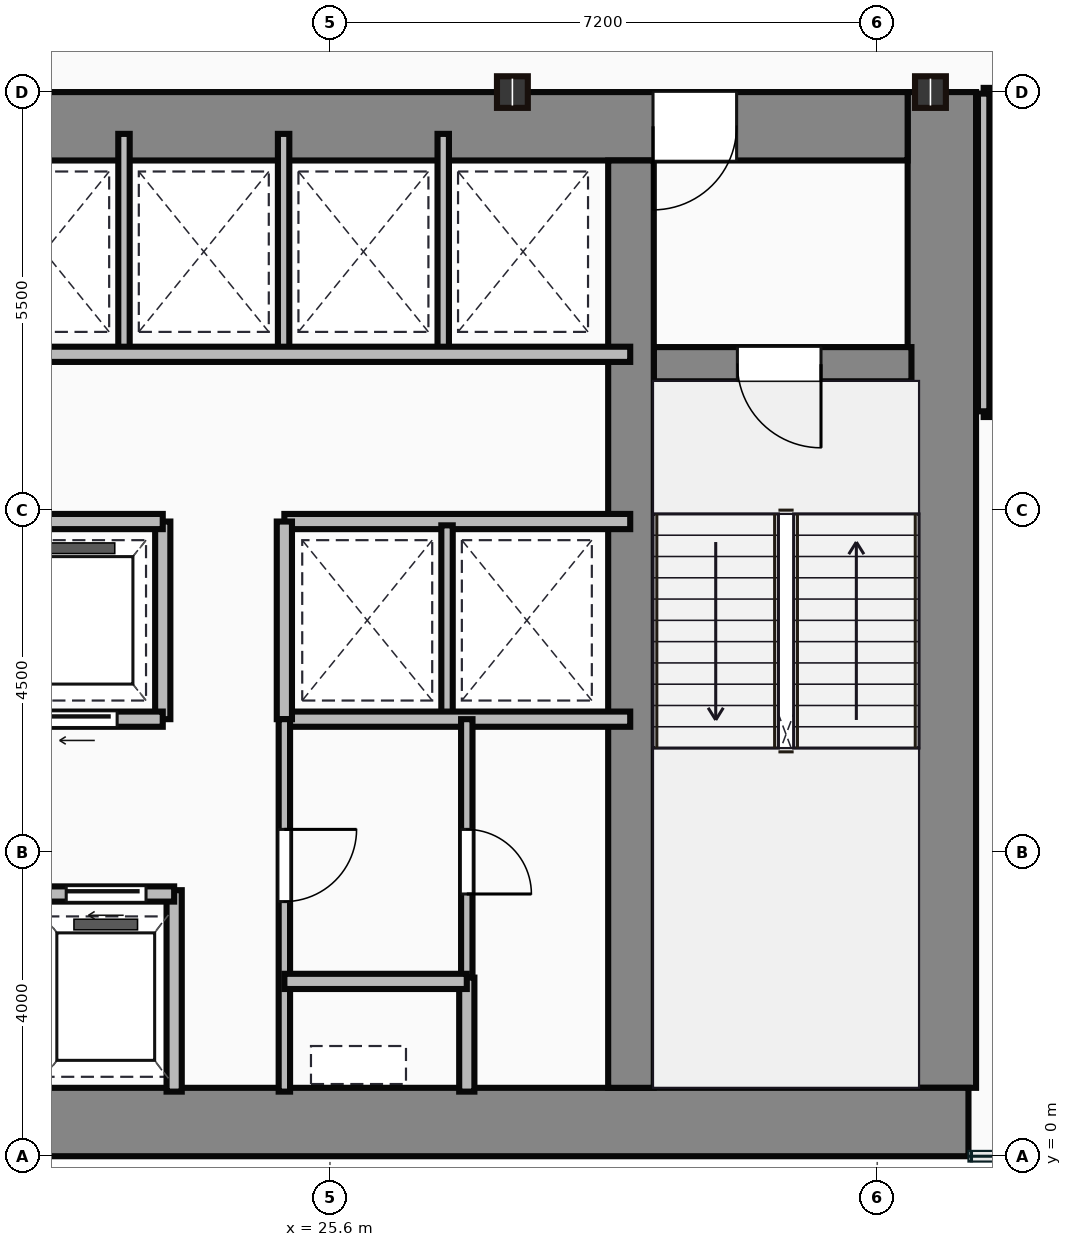
"""IFC4 building model, lengths in metres.
Left out: names, types, materials, properties, quantities, classifications, styles, units other than length and angle.
Written with IfcOpenShell. Run it as: python <this file> out.ifc"""

import sys

from ifc_helpers import new_model, si_unit, direction, frame, frame_2d, origin, origin_2d, place, context, subcontext, project, spatial, rectangle, i_section, extrude, source, transform, mapped, element, fill, save


model = new_model("IFC4")
c1 = context("Model", 3, precision=1e-05, world=origin(), true_north=direction((0.0, 1.0)))
c2 = subcontext(c1, "Body", "Model", "MODEL_VIEW")
j1 = project(units=[si_unit("LENGTHUNIT", "METRE"), si_unit("PLANEANGLEUNIT", "RADIAN")], contexts=[c1])
p1 = place(None, origin())
s1 = spatial("IfcSite", under=j1, at=p1, CompositionType="ELEMENT")
p2 = place(p1, origin())
s2 = spatial("IfcBuilding", under=s1, at=p2, CompositionType="ELEMENT")
p3 = place(p2, frame((0.0, 0.0, 79.95)))
s3 = spatial("IfcBuildingStorey", under=s2, at=p3, CompositionType="ELEMENT", Elevation=79.95)
m1 = source(origin(), c2, "Body", "SweptSolid", [
    extrude(rectangle(XDim=29.5, YDim=0.9, at=frame_2d((14.75, 0.0))), origin(), (0.0, 0.0, 1.0), 4.2),
])
p4 = place(p3, frame((4.5, 0.45, 0.0), z_axis=(0.0, 0.0, 1.0), x_axis=(1.0, 0.0, 0.0)))
e1 = element("IfcWall", 1, at=p4, inside=s3, PredefinedType="SHEAR", context=c2, shape_type="MappedRepresentation", body=[
    mapped(m1, transform((0.0, 0.0, 0.0))),
])
m2 = source(origin(), c2, "Body", "SweptSolid", [
    extrude(rectangle(XDim=13.1, YDim=0.9, at=frame_2d((6.55, 0.0))), origin(), (0.0, 0.0, 1.0), 4.2),
])
p5 = place(p3, frame((33.65, 0.9, 0.0), z_axis=(0.0, 0.0, 1.0), x_axis=(0.0, 1.0, 0.0)))
e2 = element("IfcWall", 2, at=p5, inside=s3, PredefinedType="SHEAR", context=c2, shape_type="MappedRepresentation", body=[
    mapped(m2, transform((0.0, 0.0, 0.0))),
])
m3 = source(origin(), c2, "Body", "SweptSolid", [
    extrude(rectangle(XDim=12.6, YDim=0.9, at=frame_2d((6.3, 0.0))), origin(), (0.0, 0.0, 1.0), 4.2),
])
p6 = place(p3, frame((20.6, 13.55, 0.0), z_axis=(0.0, 0.0, 1.0), x_axis=(1.0, 0.0, 0.0)))
e3 = element("IfcWall", 3, at=p6, inside=s3, PredefinedType="SHEAR", context=c2, shape_type="MappedRepresentation", body=[
    mapped(m3, transform((0.0, 0.0, 0.0))),
])
p7 = place(p6, frame((9.25, 0.0, 0.0)))
e4 = element("IfcOpeningElement", 4, at=p7, cuts=e3, PredefinedType="OPENING", context=c2, shape_type="SweptSolid", body=[
    extrude(rectangle(XDim=1.1, YDim=2.15, at=frame_2d((0.55, 1.075))), frame((0.0, 0.46, 0.0), z_axis=(0.0, -1.0, 0.0), x_axis=(1.0, 0.0, 0.0)), (0.0, 0.0, 1.0), 0.92),
])
m4 = source(origin(), c2, "Body", "SweptSolid", [
    extrude(rectangle(XDim=12.2, YDim=0.6, at=frame_2d((6.1, 0.0))), origin(), (0.0, 0.0, 1.0), 4.2),
])
p8 = place(p3, frame((29.56, 0.9, 0.0), z_axis=(0.0, 0.0, 1.0), x_axis=(0.0, 1.0, 0.0)))
e5 = element("IfcWall", 5, at=p8, inside=s3, PredefinedType="SHEAR", context=c2, shape_type="MappedRepresentation", body=[
    mapped(m4, transform((0.0, 0.0, 0.0))),
])
m5 = source(origin(), c2, "Body", "SweptSolid", [
    extrude(rectangle(XDim=3.39, YDim=0.45, at=frame_2d((1.695, 0.0))), origin(), (0.0, 0.0, 1.0), 4.2),
])
p9 = place(p3, frame((29.86, 10.42, 0.0), z_axis=(0.0, 0.0, 1.0), x_axis=(1.0, 0.0, 0.0)))
e6 = element("IfcWall", 6, at=p9, inside=s3, PredefinedType="SHEAR", context=c2, shape_type="MappedRepresentation", body=[
    mapped(m5, transform((0.0, 0.0, 0.0))),
])
p10 = place(p9, frame((1.1, 0.0, 0.0)))
e7 = element("IfcOpeningElement", 7, at=p10, cuts=e6, PredefinedType="OPENING", context=c2, shape_type="SweptSolid", body=[
    extrude(rectangle(XDim=1.1, YDim=2.15, at=frame_2d((0.55, 1.075))), frame((0.0, 0.235, 0.0), z_axis=(0.0, -1.0, 0.0), x_axis=(1.0, 0.0, 0.0)), (0.0, 0.0, 1.0), 0.47),
])
m6 = source(origin(), c2, "Body", "SweptSolid", [
    extrude(i_section(OverallWidth=0.406, OverallDepth=0.416, WebThickness=0.03, FlangeThickness=0.048, at=origin_2d()), origin(), (0.0, 0.0, 1.0), 4.2),
])
for number, where, z_axis, x_axis in (
    (8, (28.0, 14.0, 0.0), (0.0, 0.0, 1.0), (1.0, 0.0, 0.0)),
    (9, (33.5, 14.0, 0.0), (0.0, 0.0, 1.0), (1.0, 0.0, 0.0)),
):
    element("IfcColumn", number, at=place(p3, frame(where, z_axis=z_axis, x_axis=x_axis)), inside=s3, PredefinedType="COLUMN", context=c2, shape_type="MappedRepresentation", body=[
        mapped(m6, transform((0.0, 0.0, 0.0))),
    ])
m7 = source(origin(), c2, "Body", "SweptSolid", [
    extrude(rectangle(XDim=10.5, YDim=0.2, at=frame_2d((5.25, 0.0))), origin(), (0.0, 0.0, 1.0), 3.9),
])
p11 = place(p3, frame((13.05, 3.45, 0.0), z_axis=(0.0, 0.0, 1.0), x_axis=(1.0, 0.0, 0.0)))
e10 = element("IfcWall", 10, at=p11, inside=s3, PredefinedType="PARTITIONING", context=c2, shape_type="MappedRepresentation", body=[
    mapped(m7, transform((0.0, 0.0, 0.0))),
])
p12 = place(p11, frame((0.38, 0.0, 0.0)))
e11 = element("IfcOpeningElement", 11, at=p12, cuts=e10, PredefinedType="OPENING", context=c2, shape_type="SweptSolid", body=[
    extrude(rectangle(XDim=1.05, YDim=2.15, at=frame_2d((0.525, 1.075))), frame((0.0, 0.11, 0.0), z_axis=(0.0, -1.0, 0.0), x_axis=(1.0, 0.0, 0.0)), (0.0, 0.0, 1.0), 0.22),
])
p13 = place(p11, frame((2.12, 0.0, 0.0)))
e12 = element("IfcOpeningElement", 12, at=p13, cuts=e10, PredefinedType="OPENING", context=c2, shape_type="SweptSolid", body=[
    extrude(rectangle(XDim=1.05, YDim=2.15, at=frame_2d((0.525, 1.075))), frame((0.0, 0.11, 0.0), z_axis=(0.0, -1.0, 0.0), x_axis=(1.0, 0.0, 0.0)), (0.0, 0.0, 1.0), 0.22),
])
p14 = place(p11, frame((3.86, 0.0, 0.0)))
e13 = element("IfcOpeningElement", 13, at=p14, cuts=e10, PredefinedType="OPENING", context=c2, shape_type="SweptSolid", body=[
    extrude(rectangle(XDim=1.05, YDim=2.15, at=frame_2d((0.525, 1.075))), frame((0.0, 0.11, 0.0), z_axis=(0.0, -1.0, 0.0), x_axis=(1.0, 0.0, 0.0)), (0.0, 0.0, 1.0), 0.22),
])
p15 = place(p11, frame((5.6, 0.0, 0.0)))
e14 = element("IfcOpeningElement", 14, at=p15, cuts=e10, PredefinedType="OPENING", context=c2, shape_type="SweptSolid", body=[
    extrude(rectangle(XDim=1.05, YDim=2.15, at=frame_2d((0.525, 1.075))), frame((0.0, 0.11, 0.0), z_axis=(0.0, -1.0, 0.0), x_axis=(1.0, 0.0, 0.0)), (0.0, 0.0, 1.0), 0.22),
])
p16 = place(p11, frame((7.34, 0.0, 0.0)))
e15 = element("IfcOpeningElement", 15, at=p16, cuts=e10, PredefinedType="OPENING", context=c2, shape_type="SweptSolid", body=[
    extrude(rectangle(XDim=1.05, YDim=2.15, at=frame_2d((0.525, 1.075))), frame((0.0, 0.11, 0.0), z_axis=(0.0, -1.0, 0.0), x_axis=(1.0, 0.0, 0.0)), (0.0, 0.0, 1.0), 0.22),
])
p17 = place(p11, frame((9.08, 0.0, 0.0)))
e16 = element("IfcOpeningElement", 16, at=p17, cuts=e10, PredefinedType="OPENING", context=c2, shape_type="SweptSolid", body=[
    extrude(rectangle(XDim=1.05, YDim=2.15, at=frame_2d((0.525, 1.075))), frame((0.0, 0.11, 0.0), z_axis=(0.0, -1.0, 0.0), x_axis=(1.0, 0.0, 0.0)), (0.0, 0.0, 1.0), 0.22),
])
m8 = source(origin(), c2, "Body", "SweptSolid", [
    extrude(rectangle(XDim=2.65, YDim=0.2, at=frame_2d((1.325, 0.0))), origin(), (0.0, 0.0, 1.0), 3.9),
])
p18 = place(p3, frame((23.55, 0.85, 0.0), z_axis=(0.0, 0.0, 1.0), x_axis=(0.0, 1.0, 0.0)))
e17 = element("IfcWall", 17, at=p18, inside=s3, PredefinedType="PARTITIONING", context=c2, shape_type="MappedRepresentation", body=[
    mapped(m8, transform((0.0, 0.0, 0.0))),
])
m9 = source(origin(), c2, "Body", "SweptSolid", [
    extrude(rectangle(XDim=11.85, YDim=0.2, at=frame_2d((5.925, 0.0))), origin(), (0.0, 0.0, 1.0), 3.9),
])
p19 = place(p3, frame((11.55, 5.75, 0.0), z_axis=(0.0, 0.0, 1.0), x_axis=(1.0, 0.0, 0.0)))
e18 = element("IfcWall", 18, at=p19, inside=s3, PredefinedType="PARTITIONING", context=c2, shape_type="MappedRepresentation", body=[
    mapped(m9, transform((0.0, 0.0, 0.0))),
])
p20 = place(p19, frame((0.45, 0.0, 0.0)))
e19 = element("IfcOpeningElement", 19, at=p20, cuts=e18, PredefinedType="OPENING", context=c2, shape_type="SweptSolid", body=[
    extrude(rectangle(XDim=1.05, YDim=2.15, at=frame_2d((0.525, 1.075))), frame((0.0, 0.11, 0.0), z_axis=(0.0, -1.0, 0.0), x_axis=(1.0, 0.0, 0.0)), (0.0, 0.0, 1.0), 0.22),
])
p21 = place(p19, frame((2.4, 0.0, 0.0)))
e20 = element("IfcOpeningElement", 20, at=p21, cuts=e18, PredefinedType="OPENING", context=c2, shape_type="SweptSolid", body=[
    extrude(rectangle(XDim=1.05, YDim=2.15, at=frame_2d((0.525, 1.075))), frame((0.0, 0.11, 0.0), z_axis=(0.0, -1.0, 0.0), x_axis=(1.0, 0.0, 0.0)), (0.0, 0.0, 1.0), 0.22),
])
p22 = place(p19, frame((4.35, 0.0, 0.0)))
e21 = element("IfcOpeningElement", 21, at=p22, cuts=e18, PredefinedType="OPENING", context=c2, shape_type="SweptSolid", body=[
    extrude(rectangle(XDim=1.05, YDim=2.15, at=frame_2d((0.525, 1.075))), frame((0.0, 0.11, 0.0), z_axis=(0.0, -1.0, 0.0), x_axis=(1.0, 0.0, 0.0)), (0.0, 0.0, 1.0), 0.22),
])
p23 = place(p19, frame((6.3, 0.0, 0.0)))
e22 = element("IfcOpeningElement", 22, at=p23, cuts=e18, PredefinedType="OPENING", context=c2, shape_type="SweptSolid", body=[
    extrude(rectangle(XDim=1.05, YDim=2.15, at=frame_2d((0.525, 1.075))), frame((0.0, 0.11, 0.0), z_axis=(0.0, -1.0, 0.0), x_axis=(1.0, 0.0, 0.0)), (0.0, 0.0, 1.0), 0.22),
])
p24 = place(p19, frame((8.25, 0.0, 0.0)))
e23 = element("IfcOpeningElement", 23, at=p24, cuts=e18, PredefinedType="OPENING", context=c2, shape_type="SweptSolid", body=[
    extrude(rectangle(XDim=1.05, YDim=2.15, at=frame_2d((0.525, 1.075))), frame((0.0, 0.11, 0.0), z_axis=(0.0, -1.0, 0.0), x_axis=(1.0, 0.0, 0.0)), (0.0, 0.0, 1.0), 0.22),
])
p25 = place(p19, frame((10.2, 0.0, 0.0)))
e24 = element("IfcOpeningElement", 24, at=p25, cuts=e18, PredefinedType="OPENING", context=c2, shape_type="SweptSolid", body=[
    extrude(rectangle(XDim=1.05, YDim=2.15, at=frame_2d((0.525, 1.075))), frame((0.0, 0.11, 0.0), z_axis=(0.0, -1.0, 0.0), x_axis=(1.0, 0.0, 0.0)), (0.0, 0.0, 1.0), 0.22),
])
p26 = place(p3, frame((11.55, 8.35, 0.0), z_axis=(0.0, 0.0, 1.0), x_axis=(1.0, 0.0, 0.0)))
e25 = element("IfcWall", 25, at=p26, inside=s3, PredefinedType="PARTITIONING", context=c2, shape_type="MappedRepresentation", body=[
    mapped(m9, transform((0.0, 0.0, 0.0))),
])
m10 = source(origin(), c2, "Body", "SweptSolid", [
    extrude(rectangle(XDim=2.6, YDim=0.2, at=frame_2d((1.3, 0.0))), origin(), (0.0, 0.0, 1.0), 3.9),
])
p27 = place(p3, frame((23.4, 5.75, 0.0), z_axis=(0.0, 0.0, 1.0), x_axis=(0.0, 1.0, 0.0)))
e26 = element("IfcWall", 26, at=p27, inside=s3, PredefinedType="PARTITIONING", context=c2, shape_type="MappedRepresentation", body=[
    mapped(m10, transform((0.0, 0.0, 0.0))),
])
m11 = source(origin(), c2, "Body", "SweptSolid", [
    extrude(rectangle(XDim=8.8, YDim=0.2, at=frame_2d((4.4, 0.0))), origin(), (0.0, 0.0, 1.0), 3.9),
])
p28 = place(p3, frame((20.75, 10.55, 0.0), z_axis=(0.0, 0.0, 1.0), x_axis=(1.0, 0.0, 0.0)))
e27 = element("IfcWall", 27, at=p28, inside=s3, PredefinedType="PARTITIONING", context=c2, shape_type="MappedRepresentation", body=[
    mapped(m11, transform((0.0, 0.0, 0.0))),
])
m12 = source(origin(), c2, "Body", "SweptSolid", [
    extrude(rectangle(XDim=2.85, YDim=0.15, at=frame_2d((1.425, 0.0))), origin(), (0.0, 0.0, 1.0), 3.9),
])
for number, where, z_axis, x_axis in (
    (28, (22.89, 10.6, 0.0), (0.0, 0.0, 1.0), (0.0, 1.0, 0.0)),
    (29, (24.99, 10.6, 0.0), (0.0, 0.0, 1.0), (0.0, 1.0, 0.0)),
    (30, (27.09, 10.6, 0.0), (0.0, 0.0, 1.0), (0.0, 1.0, 0.0)),
):
    element("IfcWall", number, at=place(p3, frame(where, z_axis=z_axis, x_axis=x_axis)), inside=s3, PredefinedType="PARTITIONING", context=c2, shape_type="MappedRepresentation", body=[
        mapped(m12, transform((0.0, 0.0, 0.0))),
    ])
m13 = source(origin(), c2, "Body", "SweptSolid", [
    extrude(rectangle(XDim=4.55, YDim=0.2, at=frame_2d((2.275, 0.0))), origin(), (0.0, 0.0, 1.0), 3.9),
])
for number, where, z_axis, x_axis in (
    (31, (25.0, 8.35, 0.0), (0.0, 0.0, 1.0), (1.0, 0.0, 0.0)),
    (32, (25.0, 5.75, 0.0), (0.0, 0.0, 1.0), (1.0, 0.0, 0.0)),
):
    element("IfcWall", number, at=place(p3, frame(where, z_axis=z_axis, x_axis=x_axis)), inside=s3, PredefinedType="PARTITIONING", context=c2, shape_type="MappedRepresentation", body=[
        mapped(m13, transform((0.0, 0.0, 0.0))),
    ])
p29 = place(p3, frame((25.0, 5.75, 0.0), z_axis=(0.0, 0.0, 1.0), x_axis=(0.0, 1.0, 0.0)))
e33 = element("IfcWall", 33, at=p29, inside=s3, PredefinedType="PARTITIONING", context=c2, shape_type="MappedRepresentation", body=[
    mapped(m10, transform((0.0, 0.0, 0.0))),
])
m14 = source(origin(), c2, "Body", "SweptSolid", [
    extrude(rectangle(XDim=2.5, YDim=0.15, at=frame_2d((1.25, 0.0))), origin(), (0.0, 0.0, 1.0), 3.9),
])
p30 = place(p3, frame((27.14, 5.8, 0.0), z_axis=(0.0, 0.0, 1.0), x_axis=(0.0, 1.0, 0.0)))
e34 = element("IfcWall", 34, at=p30, inside=s3, PredefinedType="PARTITIONING", context=c2, shape_type="MappedRepresentation", body=[
    mapped(m14, transform((0.0, 0.0, 0.0))),
])
m15 = source(origin(), c2, "Body", "SweptSolid", [
    extrude(rectangle(XDim=4.9, YDim=0.15, at=frame_2d((2.45, 0.0))), origin(), (0.0, 0.0, 1.0), 3.9),
])
p31 = place(p3, frame((25.0, 0.85, 0.0), z_axis=(0.0, 0.0, 1.0), x_axis=(0.0, 1.0, 0.0)))
e35 = element("IfcWall", 35, at=p31, inside=s3, PredefinedType="PARTITIONING", context=c2, shape_type="MappedRepresentation", body=[
    mapped(m15, transform((0.0, 0.0, 0.0))),
])
p32 = place(p31, frame((2.5, 0.0, 0.0)))
e36 = element("IfcOpeningElement", 36, at=p32, cuts=e35, PredefinedType="OPENING", context=c2, shape_type="SweptSolid", body=[
    extrude(rectangle(XDim=0.95, YDim=2.15, at=frame_2d((0.475, 1.075))), frame((0.0, 0.085, 0.0), z_axis=(0.0, -1.0, 0.0), x_axis=(1.0, 0.0, 0.0)), (0.0, 0.0, 1.0), 0.17),
])
m16 = source(origin(), c2, "Body", "SweptSolid", [
    extrude(rectangle(XDim=2.4, YDim=0.2, at=frame_2d((1.2, 0.0))), origin(), (0.0, 0.0, 1.0), 3.9),
])
p33 = place(p3, frame((25.0, 2.3, 0.0), z_axis=(0.0, 0.0, 1.0), x_axis=(1.0, 0.0, 0.0)))
e37 = element("IfcWall", 37, at=p33, inside=s3, PredefinedType="PARTITIONING", context=c2, shape_type="MappedRepresentation", body=[
    mapped(m16, transform((0.0, 0.0, 0.0))),
])
m17 = source(origin(), c2, "Body", "SweptSolid", [
    extrude(rectangle(XDim=1.5, YDim=0.2, at=frame_2d((0.75, 0.0))), origin(), (0.0, 0.0, 1.0), 3.9),
])
p34 = place(p3, frame((27.4, 0.85, 0.0), z_axis=(0.0, 0.0, 1.0), x_axis=(0.0, 1.0, 0.0)))
e38 = element("IfcWall", 38, at=p34, inside=s3, PredefinedType="PARTITIONING", context=c2, shape_type="MappedRepresentation", body=[
    mapped(m17, transform((0.0, 0.0, 0.0))),
])
m18 = source(origin(), c2, "Body", "SweptSolid", [
    extrude(rectangle(XDim=3.4, YDim=0.15, at=frame_2d((1.7, 0.0))), origin(), (0.0, 0.0, 1.0), 3.9),
])
p35 = place(p3, frame((27.4, 2.35, 0.0), z_axis=(0.0, 0.0, 1.0), x_axis=(0.0, 1.0, 0.0)))
e39 = element("IfcWall", 39, at=p35, inside=s3, PredefinedType="PARTITIONING", context=c2, shape_type="MappedRepresentation", body=[
    mapped(m18, transform((0.0, 0.0, 0.0))),
])
p36 = place(p35, frame((1.1, 0.0, 0.0)))
e40 = element("IfcOpeningElement", 40, at=p36, cuts=e39, PredefinedType="OPENING", context=c2, shape_type="SweptSolid", body=[
    extrude(rectangle(XDim=0.85, YDim=2.1, at=frame_2d((0.425, 1.05))), frame((0.0, 0.085, 0.0), z_axis=(0.0, -1.0, 0.0), x_axis=(1.0, 0.0, 0.0)), (0.0, 0.0, 1.0), 0.17),
])
m19 = source(origin(), c2, "Body", "SweptSolid", [
    extrude(rectangle(XDim=4.8, YDim=0.15, at=frame_2d((2.4, 0.0))), origin(), (0.0, 0.0, 1.0), 3.125),
])
p37 = place(p3, frame((34.2, 13.98, 0.0), z_axis=(0.0, 0.0, 1.0), x_axis=(1.0, 0.0, 0.0)))
e41 = element("IfcWall", 41, at=p37, inside=s3, PredefinedType="PARTITIONING", context=c2, shape_type="MappedRepresentation", body=[
    mapped(m19, transform((0.0, 0.0, 0.0))),
])
p38 = place(p37, frame((0.35, 0.0, 0.0)))
e42 = element("IfcOpeningElement", 42, at=p38, cuts=e41, PredefinedType="OPENING", context=c2, shape_type="SweptSolid", body=[
    extrude(rectangle(XDim=0.85, YDim=2.1, at=frame_2d((0.425, 1.05))), frame((0.0, 0.085, 0.0), z_axis=(0.0, -1.0, 0.0), x_axis=(1.0, 0.0, 0.0)), (0.0, 0.0, 1.0), 0.17),
])
p39 = place(p37, frame((1.95, 0.0, 0.0)))
e43 = element("IfcOpeningElement", 43, at=p39, cuts=e41, PredefinedType="OPENING", context=c2, shape_type="SweptSolid", body=[
    extrude(rectangle(XDim=0.85, YDim=2.1, at=frame_2d((0.425, 1.05))), frame((0.0, 0.085, 0.0), z_axis=(0.0, -1.0, 0.0), x_axis=(1.0, 0.0, 0.0)), (0.0, 0.0, 1.0), 0.17),
])
p40 = place(p37, frame((3.5, 0.0, 0.0)))
e44 = element("IfcOpeningElement", 44, at=p40, cuts=e41, PredefinedType="OPENING", context=c2, shape_type="SweptSolid", body=[
    extrude(rectangle(XDim=0.9, YDim=2.1, at=frame_2d((0.45, 1.05))), frame((0.0, 0.085, 0.0), z_axis=(0.0, -1.0, 0.0), x_axis=(1.0, 0.0, 0.0)), (0.0, 0.0, 1.0), 0.17),
])
m20 = source(origin(), c2, "Body", "SweptSolid", [
    extrude(rectangle(XDim=4.8, YDim=0.15, at=frame_2d((2.4, 0.0))), origin(), (0.0, 0.0, 1.0), 3.9),
])
p41 = place(p3, frame((34.2, 9.8, 0.0), z_axis=(0.0, 0.0, 1.0), x_axis=(1.0, 0.0, 0.0)))
e45 = element("IfcWall", 45, at=p41, inside=s3, PredefinedType="PARTITIONING", context=c2, shape_type="MappedRepresentation", body=[
    mapped(m20, transform((0.0, 0.0, 0.0))),
])
m21 = source(origin(), c2, "Body", "SweptSolid", [
    extrude(rectangle(XDim=4.18, YDim=0.15, at=frame_2d((2.09, 0.0))), origin(), (0.0, 0.0, 1.0), 3.9),
])
p42 = place(p3, frame((34.2, 9.8, 0.0), z_axis=(0.0, 0.0, 1.0), x_axis=(0.0, 1.0, 0.0)))
e46 = element("IfcWall", 46, at=p42, inside=s3, PredefinedType="PARTITIONING", context=c2, shape_type="MappedRepresentation", body=[
    mapped(m21, transform((0.0, 0.0, 0.0))),
])
m22 = source(origin(), c2, "Body", "SweptSolid", [
    extrude(rectangle(XDim=1.1, YDim=2.15, at=frame_2d((0.55, 1.075))), frame((0.0, 0.025, 0.0), z_axis=(0.0, -1.0, 0.0), x_axis=(1.0, 0.0, 0.0)), (0.0, 0.0, 1.0), 0.05),
])
p43 = place(p10, frame((1.1, 0.0, 0.0), z_axis=(0.0, 0.0, 1.0), x_axis=(-1.0, 0.0, 0.0)))
e47 = element("IfcDoor", 47, at=p43, inside=s3, OperationType="SINGLE_SWING_RIGHT", PredefinedType="DOOR", context=c2, shape_type="MappedRepresentation", body=[
    mapped(m22, transform((0.0, 0.0, 0.0))),
])
fill(e7, e47)
p44 = place(p7, origin())
e48 = element("IfcDoor", 48, at=p44, inside=s3, OperationType="SINGLE_SWING_LEFT", PredefinedType="DOOR", context=c2, shape_type="MappedRepresentation", body=[
    mapped(m22, transform((0.0, 0.0, 0.0))),
])
fill(e4, e48)
m23 = source(origin(), c2, "Body", "SweptSolid", [
    extrude(rectangle(XDim=1.05, YDim=2.15, at=frame_2d((0.525, 1.075))), frame((0.0, 0.025, 0.0), z_axis=(0.0, -1.0, 0.0), x_axis=(1.0, 0.0, 0.0)), (0.0, 0.0, 1.0), 0.05),
])
p45 = place(p17, origin())
e49 = element("IfcDoor", 49, at=p45, inside=s3, OperationType="SLIDING_TO_LEFT", PredefinedType="DOOR", context=c2, shape_type="MappedRepresentation", body=[
    mapped(m23, transform((0.0, 0.0, 0.0))),
])
fill(e16, e49)
p46 = place(p25, frame((1.05, 0.0, 0.0), z_axis=(0.0, 0.0, 1.0), x_axis=(-1.0, 0.0, 0.0)))
e50 = element("IfcDoor", 50, at=p46, inside=s3, OperationType="SLIDING_TO_LEFT", PredefinedType="DOOR", context=c2, shape_type="MappedRepresentation", body=[
    mapped(m23, transform((0.0, 0.0, 0.0))),
])
fill(e24, e50)
m24 = source(origin(), c2, "Body", "SweptSolid", [
    extrude(rectangle(XDim=0.95, YDim=2.15, at=frame_2d((0.475, 1.075))), frame((0.0, 0.025, 0.0), z_axis=(0.0, -1.0, 0.0), x_axis=(1.0, 0.0, 0.0)), (0.0, 0.0, 1.0), 0.05),
])
p47 = place(p32, origin())
e51 = element("IfcDoor", 51, at=p47, inside=s3, OperationType="SINGLE_SWING_RIGHT", PredefinedType="DOOR", context=c2, shape_type="MappedRepresentation", body=[
    mapped(m24, transform((0.0, 0.0, 0.0))),
])
fill(e36, e51)
m25 = source(origin(), c2, "Body", "SweptSolid", [
    extrude(rectangle(XDim=0.85, YDim=2.1, at=frame_2d((0.425, 1.05))), frame((0.0, 0.025, 0.0), z_axis=(0.0, -1.0, 0.0), x_axis=(1.0, 0.0, 0.0)), (0.0, 0.0, 1.0), 0.05),
])
p48 = place(p36, frame((0.85, 0.0, 0.0), z_axis=(0.0, 0.0, 1.0), x_axis=(-1.0, 0.0, 0.0)))
e52 = element("IfcDoor", 52, at=p48, inside=s3, OperationType="SINGLE_SWING_LEFT", PredefinedType="DOOR", context=c2, shape_type="MappedRepresentation", body=[
    mapped(m25, transform((0.0, 0.0, 0.0))),
])
fill(e40, e52)
save(model, sys.argv[1])
